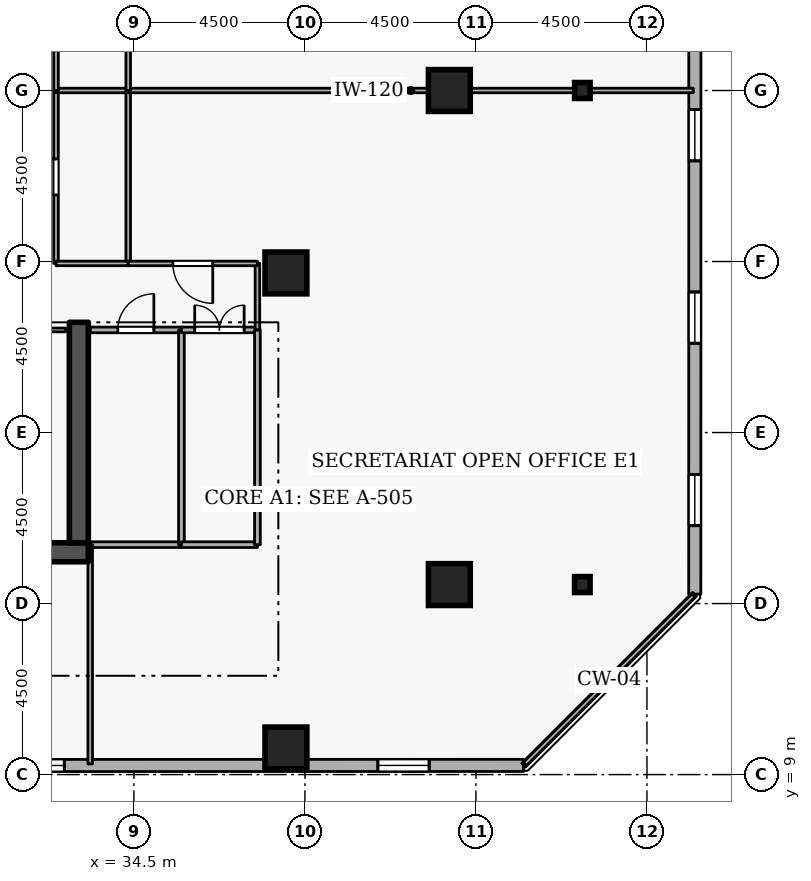
"""IFC4 building model, lengths in metres.
Left out: names, types, materials, properties, quantities, classifications, styles, units other than length and angle.
Written with IfcOpenShell. Run it as: python <this file> out.ifc"""

import sys

from ifc_helpers import new_model, si_unit, direction, frame, frame_2d, origin, origin_2d, place, context, subcontext, project, spatial, rectangle, i_section, extrude, element, fill, save


model = new_model("IFC4")
c1 = context("Model", 3, precision=1e-05, world=origin(), true_north=direction((0.0, 1.0)))
c2 = subcontext(c1, "Body", "Model", "MODEL_VIEW")
j1 = project(units=[si_unit("LENGTHUNIT", "METRE"), si_unit("PLANEANGLEUNIT", "RADIAN")], contexts=[c1])
p1 = place(None, origin())
s1 = spatial("IfcSite", under=j1, at=p1, CompositionType="ELEMENT")
p2 = place(p1, origin())
s2 = spatial("IfcBuilding", under=s1, at=p2, CompositionType="ELEMENT")
p3 = place(p2, frame((0.0, 0.0, 196.5)))
s3 = spatial("IfcBuildingStorey", under=s2, at=p3, CompositionType="ELEMENT", Elevation=196.5)
p4 = place(p3, frame((17.7, 14.85, 0.0), z_axis=(0.0, 0.0, 1.0), x_axis=(1.0, 0.0, 0.0)))
e1 = element("IfcWall", 1, at=p4, inside=s3, PredefinedType="SHEAR", context=c2, shape_type="SweptSolid", body=[
    extrude(rectangle(XDim=15.6, YDim=0.5, at=frame_2d((7.8, 0.0))), origin(), (0.0, 0.0, 1.0), 3.6),
])
p5 = place(p3, frame((33.05, 15.1, 0.0), z_axis=(0.0, 0.0, 1.0), x_axis=(0.0, 1.0, 0.0)))
e2 = element("IfcWall", 2, at=p5, inside=s3, PredefinedType="SHEAR", context=c2, shape_type="SweptSolid", body=[
    extrude(rectangle(XDim=5.8, YDim=0.5, at=frame_2d((2.9, 0.0))), origin(), (0.0, 0.0, 1.0), 3.6),
])
for number, where, z_axis, x_axis in (
    (3, (38.5, 9.7, 0.0), (0.0, 0.0, 1.0), (1.0, 0.0, 0.0)),
    (4, (42.8, 14.0, 0.0), (0.0, 0.0, 1.0), (1.0, 0.0, 0.0)),
    (5, (42.8, 27.0, 0.0), (0.0, 0.0, 1.0), (1.0, 0.0, 0.0)),
    (6, (38.5, 22.2, 0.0), (0.0, 0.0, 1.0), (1.0, 0.0, 0.0)),
):
    element("IfcColumn", number, at=place(p3, frame(where, z_axis=z_axis, x_axis=x_axis)), inside=s3, PredefinedType="COLUMN", context=c2, shape_type="SweptSolid", body=[
        extrude(rectangle(XDim=1.1, YDim=1.1, at=origin_2d()), origin(), (0.0, 0.0, 1.0), 3.6),
    ])
for number, where, z_axis, x_axis in (
    (7, (46.3, 14.0, 0.0), (0.0, 0.0, 1.0), (1.0, 0.0, 0.0)),
    (8, (46.3, 27.0, 0.0), (0.0, 0.0, 1.0), (1.0, 0.0, 0.0)),
):
    element("IfcColumn", number, at=place(p3, frame(where, z_axis=z_axis, x_axis=x_axis)), inside=s3, PredefinedType="COLUMN", context=c2, shape_type="SweptSolid", body=[
        extrude(i_section(OverallWidth=0.407, OverallDepth=0.419, WebThickness=0.031, FlangeThickness=0.049, FilletRadius=0.015, at=origin_2d()), origin(), (0.0, 0.0, 1.0), 3.6),
    ])
p6 = place(p3, frame((10.319, 9.235, 0.0), z_axis=(0.0, 0.0, 1.0), x_axis=(0.999999983007, 0.000184351399, 0.0)))
e9 = element("IfcWall", 9, at=p6, inside=s3, PredefinedType="STANDARD", context=c2, shape_type="SweptSolid", body=[
    extrude(rectangle(XDim=34.432, YDim=0.32, at=frame_2d((17.216, 0.0))), origin(), (0.0, 0.0, 1.0), 2.22),
])
p7 = place(p6, frame((6.6, 0.0, 0.72)))
e10 = element("IfcOpeningElement", 10, at=p7, cuts=e9, PredefinedType="OPENING", context=c2, shape_type="SweptSolid", body=[
    extrude(rectangle(XDim=1.35, YDim=1.05, at=frame_2d((0.675, 0.525))), frame((0.0, 0.17, 0.0), z_axis=(0.0, -1.0, 0.0), x_axis=(1.0, 0.0, 0.0)), (0.0, 0.0, 1.0), 0.34),
])
p8 = place(p6, frame((11.4, 0.0, 0.72)))
e11 = element("IfcOpeningElement", 11, at=p8, cuts=e9, PredefinedType="OPENING", context=c2, shape_type="SweptSolid", body=[
    extrude(rectangle(XDim=1.35, YDim=1.05, at=frame_2d((0.675, 0.525))), frame((0.0, 0.17, 0.0), z_axis=(0.0, -1.0, 0.0), x_axis=(1.0, 0.0, 0.0)), (0.0, 0.0, 1.0), 0.34),
])
p9 = place(p6, frame((21.0, 0.0, 0.72)))
e12 = element("IfcOpeningElement", 12, at=p9, cuts=e9, PredefinedType="OPENING", context=c2, shape_type="SweptSolid", body=[
    extrude(rectangle(XDim=1.35, YDim=1.05, at=frame_2d((0.675, 0.525))), frame((0.0, 0.17, 0.0), z_axis=(0.0, -1.0, 0.0), x_axis=(1.0, 0.0, 0.0)), (0.0, 0.0, 1.0), 0.34),
])
p10 = place(p6, frame((30.6, 0.0, 0.72)))
e13 = element("IfcOpeningElement", 13, at=p10, cuts=e9, PredefinedType="OPENING", context=c2, shape_type="SweptSolid", body=[
    extrude(rectangle(XDim=1.35, YDim=1.05, at=frame_2d((0.675, 0.525))), frame((0.0, 0.17, 0.0), z_axis=(0.0, -1.0, 0.0), x_axis=(1.0, 0.0, 0.0)), (0.0, 0.0, 1.0), 0.34),
])
p11 = place(p3, frame((49.258, 13.749, 0.0), z_axis=(0.0, 0.0, 1.0), x_axis=(0.000184351399, 0.999999983007, 0.0)))
e14 = element("IfcWall", 14, at=p11, inside=s3, PredefinedType="STANDARD", context=c2, shape_type="SweptSolid", body=[
    extrude(rectangle(XDim=34.432, YDim=0.32, at=frame_2d((17.216, 0.0))), origin(), (0.0, 0.0, 1.0), 2.22),
])
p12 = place(p11, frame((1.8, 0.0, 0.72)))
e15 = element("IfcOpeningElement", 15, at=p12, cuts=e14, PredefinedType="OPENING", context=c2, shape_type="SweptSolid", body=[
    extrude(rectangle(XDim=1.35, YDim=1.05, at=frame_2d((0.675, 0.525))), frame((0.0, 0.17, 0.0), z_axis=(0.0, -1.0, 0.0), x_axis=(1.0, 0.0, 0.0)), (0.0, 0.0, 1.0), 0.34),
])
p13 = place(p11, frame((6.6, 0.0, 0.72)))
e16 = element("IfcOpeningElement", 16, at=p13, cuts=e14, PredefinedType="OPENING", context=c2, shape_type="SweptSolid", body=[
    extrude(rectangle(XDim=1.35, YDim=1.05, at=frame_2d((0.675, 0.525))), frame((0.0, 0.17, 0.0), z_axis=(0.0, -1.0, 0.0), x_axis=(1.0, 0.0, 0.0)), (0.0, 0.0, 1.0), 0.34),
])
p14 = place(p11, frame((11.4, 0.0, 0.72)))
e17 = element("IfcOpeningElement", 17, at=p14, cuts=e14, PredefinedType="OPENING", context=c2, shape_type="SweptSolid", body=[
    extrude(rectangle(XDim=1.35, YDim=1.05, at=frame_2d((0.675, 0.525))), frame((0.0, 0.17, 0.0), z_axis=(0.0, -1.0, 0.0), x_axis=(1.0, 0.0, 0.0)), (0.0, 0.0, 1.0), 0.34),
])
p15 = place(p11, frame((16.2, 0.0, 0.72)))
e18 = element("IfcOpeningElement", 18, at=p15, cuts=e14, PredefinedType="OPENING", context=c2, shape_type="SweptSolid", body=[
    extrude(rectangle(XDim=1.35, YDim=1.05, at=frame_2d((0.675, 0.525))), frame((0.0, 0.17, 0.0), z_axis=(0.0, -1.0, 0.0), x_axis=(1.0, 0.0, 0.0)), (0.0, 0.0, 1.0), 0.34),
])
p16 = place(p11, frame((21.0, 0.0, 0.72)))
e19 = element("IfcOpeningElement", 19, at=p16, cuts=e14, PredefinedType="OPENING", context=c2, shape_type="SweptSolid", body=[
    extrude(rectangle(XDim=1.35, YDim=1.05, at=frame_2d((0.675, 0.525))), frame((0.0, 0.17, 0.0), z_axis=(0.0, -1.0, 0.0), x_axis=(1.0, 0.0, 0.0)), (0.0, 0.0, 1.0), 0.34),
])
p17 = place(p11, frame((25.8, 0.0, 0.72)))
e20 = element("IfcOpeningElement", 20, at=p17, cuts=e14, PredefinedType="OPENING", context=c2, shape_type="SweptSolid", body=[
    extrude(rectangle(XDim=1.35, YDim=1.05, at=frame_2d((0.675, 0.525))), frame((0.0, 0.17, 0.0), z_axis=(0.0, -1.0, 0.0), x_axis=(1.0, 0.0, 0.0)), (0.0, 0.0, 1.0), 0.34),
])
p18 = place(p11, frame((30.6, 0.0, 0.72)))
e21 = element("IfcOpeningElement", 21, at=p18, cuts=e14, PredefinedType="OPENING", context=c2, shape_type="SweptSolid", body=[
    extrude(rectangle(XDim=1.35, YDim=1.05, at=frame_2d((0.675, 0.525))), frame((0.0, 0.17, 0.0), z_axis=(0.0, -1.0, 0.0), x_axis=(1.0, 0.0, 0.0)), (0.0, 0.0, 1.0), 0.34),
])
p19 = place(p3, frame((30.55, 20.7, 0.0), z_axis=(0.0, 0.0, 1.0), x_axis=(1.0, 0.0, 0.0)))
e22 = element("IfcWall", 22, at=p19, inside=s3, PredefinedType="PARTITIONING", context=c2, shape_type="SweptSolid", body=[
    extrude(rectangle(XDim=2.15, YDim=0.1, at=frame_2d((1.075, 0.0))), origin(), (0.0, 0.0, 1.0), 3.32),
])
p20 = place(p19, frame((0.6, 0.0, 0.0)))
e23 = element("IfcOpeningElement", 23, at=p20, cuts=e22, PredefinedType="OPENING", context=c2, shape_type="SweptSolid", body=[
    extrude(rectangle(XDim=0.95, YDim=2.1, at=frame_2d((0.475, 1.05))), frame((0.0, 0.06, 0.0), z_axis=(0.0, -1.0, 0.0), x_axis=(1.0, 0.0, 0.0)), (0.0, 0.0, 1.0), 0.12),
])
p21 = place(p3, frame((35.75, 15.05, 0.0), z_axis=(0.0, 0.0, 1.0), x_axis=(-1.0, 0.0, 0.0)))
e24 = element("IfcWall", 24, at=p21, inside=s3, PredefinedType="PARTITIONING", context=c2, shape_type="SweptSolid", body=[
    extrude(rectangle(XDim=2.4, YDim=0.15, at=frame_2d((1.2, 0.0))), origin(), (0.0, 0.0, 1.0), 3.32),
])
p22 = place(p3, frame((33.35, 20.7, 0.0), z_axis=(0.0, 0.0, 1.0), x_axis=(1.0, 0.0, 0.0)))
e25 = element("IfcWall", 25, at=p22, inside=s3, PredefinedType="PARTITIONING", context=c2, shape_type="SweptSolid", body=[
    extrude(rectangle(XDim=2.4, YDim=0.15, at=frame_2d((1.2, 0.0))), origin(), (0.0, 0.0, 1.0), 3.32),
])
p23 = place(p22, frame((0.725, 0.0, 0.0)))
e26 = element("IfcOpeningElement", 26, at=p23, cuts=e25, PredefinedType="OPENING", context=c2, shape_type="SweptSolid", body=[
    extrude(rectangle(XDim=0.95, YDim=2.1, at=frame_2d((0.475, 1.05))), frame((0.0, 0.085, 0.0), z_axis=(0.0, -1.0, 0.0), x_axis=(1.0, 0.0, 0.0)), (0.0, 0.0, 1.0), 0.17),
])
p24 = place(p3, frame((35.75, 20.7, 0.0), z_axis=(0.0, 0.0, 1.0), x_axis=(0.0, -1.0, 0.0)))
e27 = element("IfcWall", 27, at=p24, inside=s3, PredefinedType="PARTITIONING", context=c2, shape_type="SweptSolid", body=[
    extrude(rectangle(XDim=5.65, YDim=0.15, at=frame_2d((2.825, 0.0))), origin(), (0.0, 0.0, 1.0), 3.32),
])
p25 = place(p3, frame((37.75, 15.05, 0.0), z_axis=(0.0, 0.0, 1.0), x_axis=(-1.0, 0.0, 0.0)))
e28 = element("IfcWall", 28, at=p25, inside=s3, PredefinedType="PARTITIONING", context=c2, shape_type="SweptSolid", body=[
    extrude(rectangle(XDim=2.0, YDim=0.15, at=frame_2d((1.0, 0.0))), origin(), (0.0, 0.0, 1.0), 3.32),
])
p26 = place(p3, frame((35.75, 20.7, 0.0), z_axis=(0.0, 0.0, 1.0), x_axis=(1.0, 0.0, 0.0)))
e29 = element("IfcWall", 29, at=p26, inside=s3, PredefinedType="PARTITIONING", context=c2, shape_type="SweptSolid", body=[
    extrude(rectangle(XDim=2.0, YDim=0.15, at=frame_2d((1.0, 0.0))), origin(), (0.0, 0.0, 1.0), 3.32),
])
p27 = place(p26, frame((0.35, 0.0, 0.0)))
e30 = element("IfcOpeningElement", 30, at=p27, cuts=e29, PredefinedType="OPENING", context=c2, shape_type="SweptSolid", body=[
    extrude(rectangle(XDim=1.3, YDim=2.12, at=frame_2d((0.65, 1.06))), frame((0.0, 0.085, 0.0), z_axis=(0.0, -1.0, 0.0), x_axis=(1.0, 0.0, 0.0)), (0.0, 0.0, 1.0), 0.17),
])
p28 = place(p3, frame((37.75, 20.7, 0.0), z_axis=(0.0, 0.0, 1.0), x_axis=(0.0, -1.0, 0.0)))
e31 = element("IfcWall", 31, at=p28, inside=s3, PredefinedType="PARTITIONING", context=c2, shape_type="SweptSolid", body=[
    extrude(rectangle(XDim=5.65, YDim=0.15, at=frame_2d((2.825, 0.0))), origin(), (0.0, 0.0, 1.0), 3.32),
])
p29 = place(p3, frame((32.45, 22.45, 0.0), z_axis=(0.0, 0.0, 1.0), x_axis=(0.0, 1.0, 0.0)))
e32 = element("IfcWall", 32, at=p29, inside=s3, PredefinedType="PARTITIONING", context=c2, shape_type="SweptSolid", body=[
    extrude(rectangle(XDim=4.55, YDim=0.12, at=frame_2d((2.275, 0.0))), origin(), (0.0, 0.0, 1.0), 3.32),
])
p30 = place(p29, frame((1.8, 0.0, 0.0)))
e33 = element("IfcOpeningElement", 33, at=p30, cuts=e32, PredefinedType="OPENING", context=c2, shape_type="SweptSolid", body=[
    extrude(rectangle(XDim=0.95, YDim=2.1, at=frame_2d((0.475, 1.05))), frame((0.0, 0.07, 0.0), z_axis=(0.0, -1.0, 0.0), x_axis=(1.0, 0.0, 0.0)), (0.0, 0.0, 1.0), 0.14),
])
p31 = place(p3, frame((32.45, 27.0, 0.0), z_axis=(0.0, 0.0, 1.0), x_axis=(1.0, 0.0, 0.0)))
e34 = element("IfcWall", 34, at=p31, inside=s3, PredefinedType="PARTITIONING", context=c2, shape_type="SweptSolid", body=[
    extrude(rectangle(XDim=1.9, YDim=0.12, at=frame_2d((0.95, 0.0))), origin(), (0.0, 0.0, 1.0), 3.32),
])
p32 = place(p3, frame((34.35, 27.0, 0.0), z_axis=(0.0, 0.0, 1.0), x_axis=(0.0, -1.0, 0.0)))
e35 = element("IfcWall", 35, at=p32, inside=s3, PredefinedType="PARTITIONING", context=c2, shape_type="SweptSolid", body=[
    extrude(rectangle(XDim=4.55, YDim=0.12, at=frame_2d((2.275, 0.0))), origin(), (0.0, 0.0, 1.0), 3.32),
])
p33 = place(p3, frame((34.35, 22.45, 0.0), z_axis=(0.0, 0.0, 1.0), x_axis=(-1.0, 0.0, 0.0)))
e36 = element("IfcWall", 36, at=p33, inside=s3, PredefinedType="PARTITIONING", context=c2, shape_type="SweptSolid", body=[
    extrude(rectangle(XDim=1.9, YDim=0.12, at=frame_2d((0.95, 0.0))), origin(), (0.0, 0.0, 1.0), 3.32),
])
p34 = place(p3, frame((37.75, 20.7, 0.0), z_axis=(0.0, 0.0, 1.0), x_axis=(0.0, 1.0, 0.0)))
e37 = element("IfcWall", 37, at=p34, inside=s3, PredefinedType="PARTITIONING", context=c2, shape_type="SweptSolid", body=[
    extrude(rectangle(XDim=1.75, YDim=0.12, at=frame_2d((0.875, 0.0))), origin(), (0.0, 0.0, 1.0), 3.32),
])
p35 = place(p3, frame((37.75, 22.45, 0.0), z_axis=(0.0, 0.0, 1.0), x_axis=(-1.0, 0.0, 0.0)))
e38 = element("IfcWall", 38, at=p35, inside=s3, PredefinedType="PARTITIONING", context=c2, shape_type="SweptSolid", body=[
    extrude(rectangle(XDim=3.4, YDim=0.12, at=frame_2d((1.7, 0.0))), origin(), (0.0, 0.0, 1.0), 3.32),
])
p36 = place(p35, frame((1.175, 0.0, 0.0)))
e39 = element("IfcOpeningElement", 39, at=p36, cuts=e38, PredefinedType="OPENING", context=c2, shape_type="SweptSolid", body=[
    extrude(rectangle(XDim=1.05, YDim=2.1, at=frame_2d((0.525, 1.05))), frame((0.0, 0.07, 0.0), z_axis=(0.0, -1.0, 0.0), x_axis=(1.0, 0.0, 0.0)), (0.0, 0.0, 1.0), 0.14),
])
p37 = place(p3, frame((34.35, 27.0, 0.0), z_axis=(0.0, 0.0, 1.0), x_axis=(1.0, 0.0, 0.0)))
e40 = element("IfcWall", 40, at=p37, inside=s3, PredefinedType="PARTITIONING", context=c2, shape_type="SweptSolid", body=[
    extrude(rectangle(XDim=14.87, YDim=0.12, at=frame_2d((7.435, 0.0))), origin(), (0.0, 0.0, 1.0), 2.862),
])
p38 = place(p3, frame((49.22, 13.713, 0.0), z_axis=(0.0, 0.0, 1.0), x_axis=(-0.707106781187, -0.707106781187, 0.0)))
e41 = element("IfcWall", 41, at=p38, inside=s3, PredefinedType="PARTITIONING", context=c2, shape_type="SweptSolid", body=[
    extrude(rectangle(XDim=6.269, YDim=0.12, at=frame_2d((3.134, 0.0))), origin(), (0.0, 0.0, 1.0), 3.32),
])
p39 = place(p3, frame((33.35, 9.28, 0.0), z_axis=(0.0, 0.0, 1.0), x_axis=(0.0, 1.0, 0.0)))
e42 = element("IfcWall", 42, at=p39, inside=s3, PredefinedType="PARTITIONING", context=c2, shape_type="SweptSolid", body=[
    extrude(rectangle(XDim=5.77, YDim=0.12, at=frame_2d((2.885, 0.0))), origin(), (0.0, 0.0, 1.0), 2.525),
])
p40 = place(p3, frame((32.45, 27.0, 0.0), z_axis=(0.0, 0.0, 1.0), x_axis=(0.0, 1.0, 0.0)))
e43 = element("IfcWall", 43, at=p40, inside=s3, PredefinedType="PARTITIONING", context=c2, shape_type="SweptSolid", body=[
    extrude(rectangle(XDim=4.55, YDim=0.12, at=frame_2d((2.275, 0.0))), origin(), (0.0, 0.0, 1.0), 3.32),
])
p41 = place(p40, frame((1.8, 0.0, 0.0)))
e44 = element("IfcOpeningElement", 44, at=p41, cuts=e43, PredefinedType="OPENING", context=c2, shape_type="SweptSolid", body=[
    extrude(rectangle(XDim=0.95, YDim=2.1, at=frame_2d((0.475, 1.05))), frame((0.0, 0.07, 0.0), z_axis=(0.0, -1.0, 0.0), x_axis=(1.0, 0.0, 0.0)), (0.0, 0.0, 1.0), 0.14),
])
p42 = place(p3, frame((34.35, 31.55, 0.0), z_axis=(0.0, 0.0, 1.0), x_axis=(0.0, -1.0, 0.0)))
e45 = element("IfcWall", 45, at=p42, inside=s3, PredefinedType="PARTITIONING", context=c2, shape_type="SweptSolid", body=[
    extrude(rectangle(XDim=4.55, YDim=0.12, at=frame_2d((2.275, 0.0))), origin(), (0.0, 0.0, 1.0), 3.32),
])
p43 = place(p9, origin())
e46 = element("IfcWindow", 46, at=p43, inside=s3, PartitioningType="SINGLE_PANEL", PredefinedType="WINDOW", context=c2, shape_type="SweptSolid", body=[
    extrude(rectangle(XDim=1.35, YDim=1.05, at=frame_2d((0.675, 0.525))), frame((0.0, 0.03, 0.0), z_axis=(0.0, -1.0, 0.0), x_axis=(1.0, 0.0, 0.0)), (0.0, 0.0, 1.0), 0.06),
])
fill(e12, e46)
p44 = place(p10, origin())
e47 = element("IfcWindow", 47, at=p44, inside=s3, PartitioningType="SINGLE_PANEL", PredefinedType="WINDOW", context=c2, shape_type="SweptSolid", body=[
    extrude(rectangle(XDim=1.35, YDim=1.05, at=frame_2d((0.675, 0.525))), frame((0.0, 0.03, 0.0), z_axis=(0.0, -1.0, 0.0), x_axis=(1.0, 0.0, 0.0)), (0.0, 0.0, 1.0), 0.06),
])
fill(e13, e47)
p45 = place(p12, origin())
e48 = element("IfcWindow", 48, at=p45, inside=s3, PartitioningType="SINGLE_PANEL", PredefinedType="WINDOW", context=c2, shape_type="SweptSolid", body=[
    extrude(rectangle(XDim=1.35, YDim=1.05, at=frame_2d((0.675, 0.525))), frame((0.0, 0.03, 0.0), z_axis=(0.0, -1.0, 0.0), x_axis=(1.0, 0.0, 0.0)), (0.0, 0.0, 1.0), 0.06),
])
fill(e15, e48)
p46 = place(p13, origin())
e49 = element("IfcWindow", 49, at=p46, inside=s3, PartitioningType="SINGLE_PANEL", PredefinedType="WINDOW", context=c2, shape_type="SweptSolid", body=[
    extrude(rectangle(XDim=1.35, YDim=1.05, at=frame_2d((0.675, 0.525))), frame((0.0, 0.03, 0.0), z_axis=(0.0, -1.0, 0.0), x_axis=(1.0, 0.0, 0.0)), (0.0, 0.0, 1.0), 0.06),
])
fill(e16, e49)
p47 = place(p14, origin())
e50 = element("IfcWindow", 50, at=p47, inside=s3, PartitioningType="SINGLE_PANEL", PredefinedType="WINDOW", context=c2, shape_type="SweptSolid", body=[
    extrude(rectangle(XDim=1.35, YDim=1.05, at=frame_2d((0.675, 0.525))), frame((0.0, 0.03, 0.0), z_axis=(0.0, -1.0, 0.0), x_axis=(1.0, 0.0, 0.0)), (0.0, 0.0, 1.0), 0.06),
])
fill(e17, e50)
p48 = place(p23, origin())
e51 = element("IfcDoor", 51, at=p48, inside=s3, OperationType="SINGLE_SWING_RIGHT", PredefinedType="DOOR", context=c2, shape_type="SweptSolid", body=[
    extrude(rectangle(XDim=0.95, YDim=2.1, at=frame_2d((0.475, 1.05))), frame((0.0, 0.025, 0.0), z_axis=(0.0, -1.0, 0.0), x_axis=(1.0, 0.0, 0.0)), (0.0, 0.0, 1.0), 0.05),
])
fill(e26, e51)
p49 = place(p27, origin())
e52 = element("IfcDoor", 52, at=p49, inside=s3, OperationType="DOUBLE_DOOR_SINGLE_SWING", PredefinedType="DOOR", context=c2, shape_type="SweptSolid", body=[
    extrude(rectangle(XDim=1.3, YDim=2.12, at=frame_2d((0.65, 1.06))), frame((0.0, 0.025, 0.0), z_axis=(0.0, -1.0, 0.0), x_axis=(1.0, 0.0, 0.0)), (0.0, 0.0, 1.0), 0.05),
])
fill(e30, e52)
p50 = place(p30, origin())
e53 = element("IfcDoor", 53, at=p50, inside=s3, OperationType="SINGLE_SWING_RIGHT", PredefinedType="DOOR", context=c2, shape_type="SweptSolid", body=[
    extrude(rectangle(XDim=0.95, YDim=2.1, at=frame_2d((0.475, 1.05))), frame((0.0, 0.025, 0.0), z_axis=(0.0, -1.0, 0.0), x_axis=(1.0, 0.0, 0.0)), (0.0, 0.0, 1.0), 0.05),
])
fill(e33, e53)
p51 = place(p36, origin())
e54 = element("IfcDoor", 54, at=p51, inside=s3, OperationType="SINGLE_SWING_LEFT", PredefinedType="DOOR", context=c2, shape_type="SweptSolid", body=[
    extrude(rectangle(XDim=1.05, YDim=2.1, at=frame_2d((0.525, 1.05))), frame((0.0, 0.025, 0.0), z_axis=(0.0, -1.0, 0.0), x_axis=(1.0, 0.0, 0.0)), (0.0, 0.0, 1.0), 0.05),
])
fill(e39, e54)
save(model, sys.argv[1])
